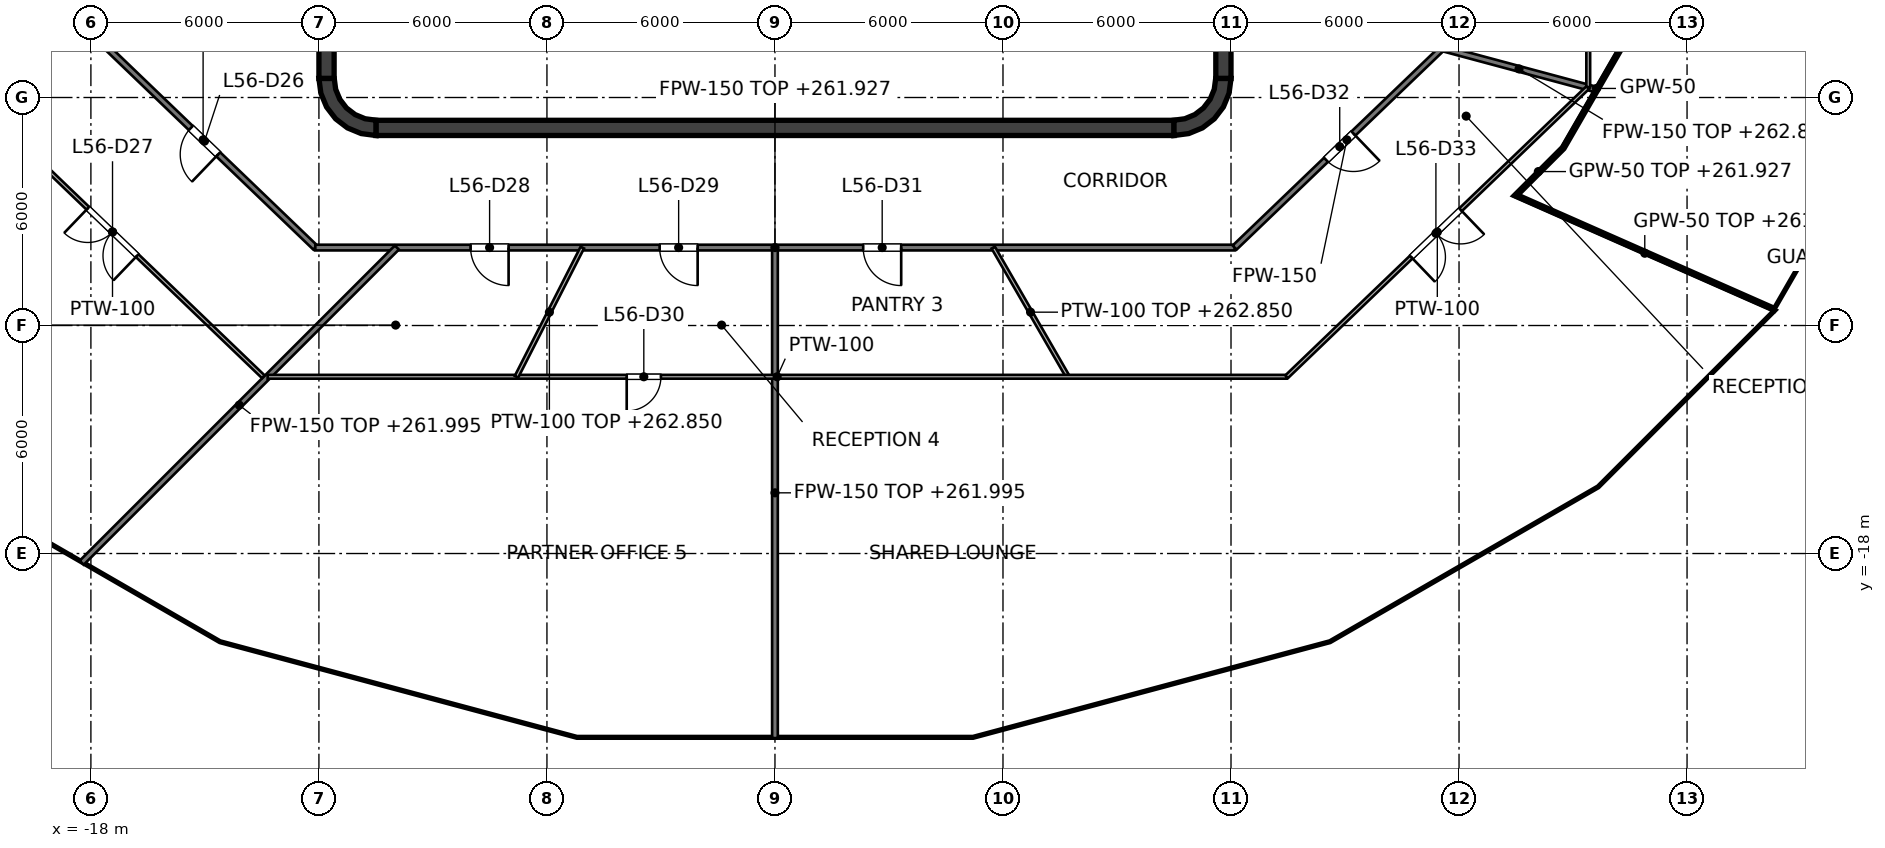
"""IFC4 building model, lengths in metres.
Left out: names, types, materials, properties, quantities, classifications, styles, units other than length and angle.
Written with IfcOpenShell. Run it as: python <this file> out.ifc"""

import sys

from ifc_helpers import new_model, si_unit, direction, frame, frame_2d, origin, place, context, subcontext, project, spatial, polyline, rectangle, outline, extrude, element, fill, save


model = new_model("IFC4")
c1 = context("Model", 3, precision=1e-05, world=origin(), true_north=direction((0.0, 1.0)))
c2 = subcontext(c1, "Body", "Model", "MODEL_VIEW")
j1 = project(units=[si_unit("LENGTHUNIT", "METRE"), si_unit("PLANEANGLEUNIT", "RADIAN")], contexts=[c1])
p1 = place(None, origin())
s1 = spatial("IfcSite", under=j1, at=p1, CompositionType="ELEMENT")
p2 = place(p1, origin())
s2 = spatial("IfcBuilding", under=s1, at=p2, CompositionType="ELEMENT")
p3 = place(p2, frame((0.0, 0.0, 259.0)))
s3 = spatial("IfcBuildingStorey", under=s2, at=p3, CompositionType="ELEMENT", Elevation=259.0)
p4 = place(p3, frame((-10.5, -6.8, 0.0), z_axis=(0.0, 0.0, 1.0), x_axis=(1.0, 0.0, 0.0)))
e1 = element("IfcWall", 1, at=p4, inside=s3, PredefinedType="SHEAR", context=c2, shape_type="SweptSolid", body=[
    extrude(rectangle(XDim=21.0, YDim=0.4, at=frame_2d((10.5, 0.0))), origin(), (0.0, 0.0, 1.0), 4.0),
])
p5 = place(p3, frame((11.8, -5.5, 0.0), z_axis=(0.0, 0.0, 1.0), x_axis=(0.0, 1.0, 0.0)))
e2 = element("IfcWall", 2, at=p5, inside=s3, PredefinedType="SHEAR", context=c2, shape_type="SweptSolid", body=[
    extrude(rectangle(XDim=11.0, YDim=0.4, at=frame_2d((5.5, 0.0))), origin(), (0.0, 0.0, 1.0), 4.0),
])
p6 = place(p5, frame((3.2, 0.0, 0.0)))
e3 = element("IfcOpeningElement", 3, at=p6, cuts=e2, PredefinedType="OPENING", context=c2, shape_type="SweptSolid", body=[
    extrude(rectangle(XDim=1.0, YDim=2.1, at=frame_2d((0.5, 1.05))), frame((0.0, 0.2, 0.0), z_axis=(0.0, -1.0, 0.0), x_axis=(1.0, 0.0, 0.0)), (0.0, 0.0, 1.0), 0.4),
])
p7 = place(p5, frame((6.1, 0.0, 0.0)))
e4 = element("IfcOpeningElement", 4, at=p7, cuts=e2, PredefinedType="OPENING", context=c2, shape_type="SweptSolid", body=[
    extrude(rectangle(XDim=1.0, YDim=2.1, at=frame_2d((0.5, 1.05))), frame((0.0, 0.2, 0.0), z_axis=(0.0, -1.0, 0.0), x_axis=(1.0, 0.0, 0.0)), (0.0, 0.0, 1.0), 0.4),
])
p8 = place(p5, frame((0.9, 0.0, 0.0)))
e5 = element("IfcOpeningElement", 5, at=p8, cuts=e2, PredefinedType="OPENING", context=c2, shape_type="SweptSolid", body=[
    extrude(rectangle(XDim=1.2, YDim=2.1, at=frame_2d((0.6, 1.05))), frame((0.0, 0.2, 0.0), z_axis=(0.0, -1.0, 0.0), x_axis=(1.0, 0.0, 0.0)), (0.0, 0.0, 1.0), 0.4),
])
p9 = place(p5, frame((8.9, 0.0, 0.0)))
e6 = element("IfcOpeningElement", 6, at=p9, cuts=e2, PredefinedType="OPENING", context=c2, shape_type="SweptSolid", body=[
    extrude(rectangle(XDim=1.2, YDim=2.1, at=frame_2d((0.6, 1.05))), frame((0.0, 0.2, 0.0), z_axis=(0.0, -1.0, 0.0), x_axis=(1.0, 0.0, 0.0)), (0.0, 0.0, 1.0), 0.4),
])
p10 = place(p3, frame((-11.8, -5.5, 0.0), z_axis=(0.0, 0.0, 1.0), x_axis=(0.0, 1.0, 0.0)))
e7 = element("IfcWall", 7, at=p10, inside=s3, PredefinedType="SHEAR", context=c2, shape_type="SweptSolid", body=[
    extrude(rectangle(XDim=11.0, YDim=0.4, at=frame_2d((5.5, 0.0))), origin(), (0.0, 0.0, 1.0), 4.0),
])
p11 = place(p10, frame((3.8, 0.0, 0.0)))
e8 = element("IfcOpeningElement", 8, at=p11, cuts=e7, PredefinedType="OPENING", context=c2, shape_type="SweptSolid", body=[
    extrude(rectangle(XDim=1.0, YDim=2.1, at=frame_2d((0.5, 1.05))), frame((0.0, 0.2, 0.0), z_axis=(0.0, -1.0, 0.0), x_axis=(1.0, 0.0, 0.0)), (0.0, 0.0, 1.0), 0.4),
])
p12 = place(p10, frame((6.7, 0.0, 0.0)))
e9 = element("IfcOpeningElement", 9, at=p12, cuts=e7, PredefinedType="OPENING", context=c2, shape_type="SweptSolid", body=[
    extrude(rectangle(XDim=1.0, YDim=2.1, at=frame_2d((0.5, 1.05))), frame((0.0, 0.2, 0.0), z_axis=(0.0, -1.0, 0.0), x_axis=(1.0, 0.0, 0.0)), (0.0, 0.0, 1.0), 0.4),
])
p13 = place(p10, frame((0.9, 0.0, 0.0)))
e10 = element("IfcOpeningElement", 10, at=p13, cuts=e7, PredefinedType="OPENING", context=c2, shape_type="SweptSolid", body=[
    extrude(rectangle(XDim=1.2, YDim=2.1, at=frame_2d((0.6, 1.05))), frame((0.0, 0.2, 0.0), z_axis=(0.0, -1.0, 0.0), x_axis=(1.0, 0.0, 0.0)), (0.0, 0.0, 1.0), 0.4),
])
p14 = place(p10, frame((8.9, 0.0, 0.0)))
e11 = element("IfcOpeningElement", 11, at=p14, cuts=e7, PredefinedType="OPENING", context=c2, shape_type="SweptSolid", body=[
    extrude(rectangle(XDim=1.2, YDim=2.1, at=frame_2d((0.6, 1.05))), frame((0.0, 0.2, 0.0), z_axis=(0.0, -1.0, 0.0), x_axis=(1.0, 0.0, 0.0)), (0.0, 0.0, 1.0), 0.4),
])
p15 = place(p3, origin())
e12 = element("IfcWall", 12, at=p15, inside=s3, PredefinedType="SHEAR", context=c2, shape_type="SweptSolid", body=[
    extrude(outline(polyline([(-10.5, -7.0), (-10.5, -6.596), (-10.784, -6.559), (-11.048, -6.45), (-11.275, -6.275), (-11.45, -6.048), (-11.559, -5.784), (-11.596, -5.5), (-12.0, -5.5), (-11.949, -5.888), (-11.799, -6.25), (-11.561, -6.561), (-11.25, -6.799), (-10.888, -6.949), (-10.5, -7.0)])), origin(), (0.0, 0.0, 1.0), 4.0),
])
e13 = element("IfcWall", 13, at=p15, inside=s3, PredefinedType="SHEAR", context=c2, shape_type="SweptSolid", body=[
    extrude(outline(polyline([(12.0, -5.5), (11.596, -5.5), (11.559, -5.784), (11.45, -6.048), (11.275, -6.275), (11.048, -6.45), (10.784, -6.559), (10.5, -6.596), (10.5, -7.0), (10.888, -6.949), (11.25, -6.799), (11.561, -6.561), (11.799, -6.25), (11.949, -5.888), (12.0, -5.5)])), origin(), (0.0, 0.0, 1.0), 4.0),
])
p16 = place(p3, frame((-1.2, -6.6, 0.0), z_axis=(0.0, 0.0, 1.0), x_axis=(0.0, 1.0, 0.0)))
e14 = element("IfcWall", 14, at=p16, inside=s3, PredefinedType="PARTITIONING", context=c2, shape_type="SweptSolid", body=[
    extrude(rectangle(XDim=2.5, YDim=0.15, at=frame_2d((1.25, 0.0))), origin(), (0.0, 0.0, 1.0), 3.85),
])
p17 = place(p16, frame((0.8, 0.0, 0.0)))
e15 = element("IfcOpeningElement", 15, at=p17, cuts=e14, PredefinedType="OPENING", context=c2, shape_type="SweptSolid", body=[
    extrude(rectangle(XDim=0.9, YDim=2.1, at=frame_2d((0.45, 1.05))), frame((0.0, 0.075, 0.0), z_axis=(0.0, -1.0, 0.0), x_axis=(1.0, 0.0, 0.0)), (0.0, 0.0, 1.0), 0.15),
])
p18 = place(p3, frame((9.0, -6.6, 0.0), z_axis=(0.0, 0.0, 1.0), x_axis=(0.0, 1.0, 0.0)))
e16 = element("IfcWall", 16, at=p18, inside=s3, PredefinedType="SOLIDWALL", context=c2, shape_type="SweptSolid", body=[
    extrude(rectangle(XDim=2.5, YDim=0.25, at=frame_2d((1.25, 0.0))), origin(), (0.0, 0.0, 1.0), 3.85),
])
p19 = place(p18, frame((0.65, 0.0, 0.0)))
e17 = element("IfcOpeningElement", 17, at=p19, cuts=e16, PredefinedType="OPENING", context=c2, shape_type="SweptSolid", body=[
    extrude(rectangle(XDim=1.2, YDim=2.1, at=frame_2d((0.6, 1.05))), frame((0.0, 0.125, 0.0), z_axis=(0.0, -1.0, 0.0), x_axis=(1.0, 0.0, 0.0)), (0.0, 0.0, 1.0), 0.25),
])
p20 = place(p3, frame((-9.0, -6.6, 0.0), z_axis=(0.0, 0.0, 1.0), x_axis=(0.0, 1.0, 0.0)))
e18 = element("IfcWall", 18, at=p20, inside=s3, PredefinedType="PARTITIONING", context=c2, shape_type="SweptSolid", body=[
    extrude(rectangle(XDim=2.5, YDim=0.25, at=frame_2d((1.25, 0.0))), origin(), (0.0, 0.0, 1.0), 3.85),
])
p21 = place(p20, frame((0.75, 0.0, 0.0)))
e19 = element("IfcOpeningElement", 19, at=p21, cuts=e18, PredefinedType="OPENING", context=c2, shape_type="SweptSolid", body=[
    extrude(rectangle(XDim=1.0, YDim=2.1, at=frame_2d((0.5, 1.05))), frame((0.0, 0.125, 0.0), z_axis=(0.0, -1.0, 0.0), x_axis=(1.0, 0.0, 0.0)), (0.0, 0.0, 1.0), 0.25),
])
p22 = place(p3, frame((3.15, -6.6, 0.0), z_axis=(0.0, 0.0, 1.0), x_axis=(0.0, 1.0, 0.0)))
e20 = element("IfcWall", 20, at=p22, inside=s3, PredefinedType="SOLIDWALL", context=c2, shape_type="SweptSolid", body=[
    extrude(rectangle(XDim=2.5, YDim=0.25, at=frame_2d((1.25, 0.0))), origin(), (0.0, 0.0, 1.0), 3.85),
])
p23 = place(p3, frame((-2.9, -6.6, 0.0), z_axis=(0.0, 0.0, 1.0), x_axis=(0.0, 1.0, 0.0)))
e21 = element("IfcWall", 21, at=p23, inside=s3, PredefinedType="PARTITIONING", context=c2, shape_type="SweptSolid", body=[
    extrude(rectangle(XDim=2.5, YDim=0.25, at=frame_2d((1.25, 0.0))), origin(), (0.0, 0.0, 1.0), 3.85),
])
p24 = place(p23, frame((0.8, 0.0, 0.0)))
e22 = element("IfcOpeningElement", 22, at=p24, cuts=e21, PredefinedType="OPENING", context=c2, shape_type="SweptSolid", body=[
    extrude(rectangle(XDim=0.9, YDim=2.1, at=frame_2d((0.45, 1.05))), frame((0.0, 0.125, 0.0), z_axis=(0.0, -1.0, 0.0), x_axis=(1.0, 0.0, 0.0)), (0.0, 0.0, 1.0), 0.25),
])
p25 = place(p3, frame((-18.0, -4.278, 0.0), z_axis=(0.0, 0.0, 1.0), x_axis=(0.721290181137, -0.692633001376, 0.0)))
e23 = element("IfcWall", 23, at=p25, inside=s3, PredefinedType="PARTITIONING", context=c2, shape_type="SweptSolid", body=[
    extrude(rectangle(XDim=8.187, YDim=0.15, at=frame_2d((4.094, 0.0))), origin(), (0.0, 0.0, 1.0), 2.918),
])
p26 = place(p25, frame((3.645, 0.0, 0.0)))
e24 = element("IfcOpeningElement", 24, at=p26, cuts=e23, PredefinedType="OPENING", context=c2, shape_type="SweptSolid", body=[
    extrude(rectangle(XDim=1.0, YDim=2.1, at=frame_2d((0.5, 1.05))), frame((0.0, 0.075, 0.0), z_axis=(0.0, -1.0, 0.0), x_axis=(1.0, 0.0, 0.0)), (0.0, 0.0, 1.0), 0.15),
])
p27 = place(p3, frame((17.556, -4.704, 0.0), z_axis=(0.0, 0.0, 1.0), x_axis=(0.965793364166, -0.259312895424, 0.0)))
e25 = element("IfcWall", 25, at=p27, inside=s3, PredefinedType="PARTITIONING", context=c2, shape_type="SweptSolid", body=[
    extrude(rectangle(XDim=4.189, YDim=0.15, at=frame_2d((2.094, 0.0))), origin(), (0.0, 0.0, 1.0), 3.85),
])
p28 = place(p3, frame((-12.095, -9.949, 0.0), z_axis=(0.0, 0.0, 1.0), x_axis=(1.0, 0.0, 0.0)))
e26 = element("IfcWall", 26, at=p28, inside=s3, PredefinedType="PARTITIONING", context=c2, shape_type="SweptSolid", body=[
    extrude(rectangle(XDim=24.19, YDim=0.15, at=frame_2d((12.095, 0.0))), origin(), (0.0, 0.0, 1.0), 2.927),
])
p29 = place(p28, frame((4.086, 0.0, 0.0)))
e27 = element("IfcOpeningElement", 27, at=p29, cuts=e26, PredefinedType="OPENING", context=c2, shape_type="SweptSolid", body=[
    extrude(rectangle(XDim=1.0, YDim=2.1, at=frame_2d((0.5, 1.05))), frame((0.0, 0.075, 0.0), z_axis=(0.0, -1.0, 0.0), x_axis=(1.0, 0.0, 0.0)), (0.0, 0.0, 1.0), 0.15),
])
p30 = place(p28, frame((9.061, 0.0, 0.0)))
e28 = element("IfcOpeningElement", 28, at=p30, cuts=e26, PredefinedType="OPENING", context=c2, shape_type="SweptSolid", body=[
    extrude(rectangle(XDim=1.0, YDim=2.1, at=frame_2d((0.5, 1.05))), frame((0.0, 0.075, 0.0), z_axis=(0.0, -1.0, 0.0), x_axis=(1.0, 0.0, 0.0)), (0.0, 0.0, 1.0), 0.15),
])
p31 = place(p28, frame((14.417, 0.0, 0.0)))
e29 = element("IfcOpeningElement", 29, at=p31, cuts=e26, PredefinedType="OPENING", context=c2, shape_type="SweptSolid", body=[
    extrude(rectangle(XDim=1.0, YDim=2.1, at=frame_2d((0.5, 1.05))), frame((0.0, 0.075, 0.0), z_axis=(0.0, -1.0, 0.0), x_axis=(1.0, 0.0, 0.0)), (0.0, 0.0, 1.0), 0.15),
])
p32 = place(p3, frame((12.095, -9.949, 0.0), z_axis=(0.0, 0.0, 1.0), x_axis=(0.721348586031, 0.692572174889, 0.0)))
e30 = element("IfcWall", 30, at=p32, inside=s3, PredefinedType="PARTITIONING", context=c2, shape_type="SweptSolid", body=[
    extrude(rectangle(XDim=8.187, YDim=0.15, at=frame_2d((4.094, 0.0))), origin(), (0.0, 0.0, 1.0), 2.918),
])
p33 = place(p32, frame((3.334, 0.0, 0.0)))
e31 = element("IfcOpeningElement", 31, at=p33, cuts=e30, PredefinedType="OPENING", context=c2, shape_type="SweptSolid", body=[
    extrude(rectangle(XDim=1.0, YDim=2.1, at=frame_2d((0.5, 1.05))), frame((0.0, 0.075, 0.0), z_axis=(0.0, -1.0, 0.0), x_axis=(1.0, 0.0, 0.0)), (0.0, 0.0, 1.0), 0.15),
])
p34 = place(p3, frame((-18.242, -18.242, 0.0), z_axis=(0.0, 0.0, 1.0), x_axis=(0.707106781187, 0.707106781187, 0.0)))
e32 = element("IfcWall", 32, at=p34, inside=s3, PredefinedType="PARTITIONING", context=c2, shape_type="SweptSolid", body=[
    extrude(rectangle(XDim=11.728, YDim=0.15, at=frame_2d((5.864, 0.0))), origin(), (0.0, 0.0, 1.0), 2.995),
])
p35 = place(p3, frame((0.0, -22.857, 0.0), z_axis=(0.0, 0.0, 1.0), x_axis=(0.0, 1.0, 0.0)))
e33 = element("IfcWall", 33, at=p35, inside=s3, PredefinedType="PARTITIONING", context=c2, shape_type="SweptSolid", body=[
    extrude(rectangle(XDim=12.908, YDim=0.15, at=frame_2d((6.454, 0.0))), origin(), (0.0, 0.0, 1.0), 2.995),
])
p36 = place(p3, frame((19.453, -8.583, 0.0), z_axis=(0.0, 0.0, 1.0), x_axis=(0.914941111659, -0.40358736625, 0.0)))
e34 = element("IfcWall", 34, at=p36, inside=s3, PredefinedType="PARTITIONING", context=c2, shape_type="SweptSolid", body=[
    extrude(rectangle(XDim=7.508, YDim=0.05, at=frame_2d((3.754, 0.0))), origin(), (0.0, 0.0, 1.0), 2.927),
])
p37 = place(p3, frame((19.453, -8.583, 0.0), z_axis=(0.0, 0.0, 1.0), x_axis=(0.706834345547, 0.707379111902, 0.0)))
e35 = element("IfcWall", 35, at=p37, inside=s3, PredefinedType="PARTITIONING", context=c2, shape_type="SweptSolid", body=[
    extrude(rectangle(XDim=1.793, YDim=0.05, at=frame_2d((0.896, 0.0))), origin(), (0.0, 0.0, 1.0), 2.927),
])
p38 = place(p3, frame((20.72, -7.315, 0.0), z_axis=(0.0, 0.0, 1.0), x_axis=(0.500032687935, 0.866006530574, 0.0)))
e36 = element("IfcWall", 36, at=p38, inside=s3, PredefinedType="PARTITIONING", context=c2, shape_type="SweptSolid", body=[
    extrude(rectangle(XDim=3.588, YDim=0.05, at=frame_2d((1.794, 0.0))), origin(), (0.0, 0.0, 1.0), 2.918),
])
p39 = place(p3, frame((5.744, -9.949, 0.0), z_axis=(0.0, 0.0, 1.0), x_axis=(0.500011323479, -0.866018866072, 0.0)))
e37 = element("IfcWall", 37, at=p39, inside=s3, PredefinedType="PARTITIONING", context=c2, shape_type="SweptSolid", body=[
    extrude(rectangle(XDim=3.926, YDim=0.1, at=frame_2d((1.963, 0.0))), origin(), (0.0, 0.0, 1.0), 3.85),
])
p40 = place(p3, frame((-21.4, -5.727, 0.0), z_axis=(0.0, 0.0, 1.0), x_axis=(0.72128312314, -0.692640351317, 0.0)))
e38 = element("IfcWall", 38, at=p40, inside=s3, PredefinedType="PARTITIONING", context=c2, shape_type="SweptSolid", body=[
    extrude(rectangle(XDim=11.004, YDim=0.1, at=frame_2d((5.502, 0.0))), origin(), (0.0, 0.0, 1.0), 2.927),
])
p41 = place(p40, frame((4.603, 0.0, 0.0)))
e39 = element("IfcOpeningElement", 39, at=p41, cuts=e38, PredefinedType="OPENING", context=c2, shape_type="SweptSolid", body=[
    extrude(rectangle(XDim=1.8, YDim=2.1, at=frame_2d((0.9, 1.05))), frame((0.0, 0.05, 0.0), z_axis=(0.0, -1.0, 0.0), x_axis=(1.0, 0.0, 0.0)), (0.0, 0.0, 1.0), 0.1),
])
p42 = place(p3, frame((-13.349, -13.349, 0.0), z_axis=(0.0, 0.0, 1.0), x_axis=(1.0, 0.0, 0.0)))
e40 = element("IfcWall", 40, at=p42, inside=s3, PredefinedType="PARTITIONING", context=c2, shape_type="SweptSolid", body=[
    extrude(rectangle(XDim=26.812, YDim=0.1, at=frame_2d((13.406, 0.0))), origin(), (0.0, 0.0, 1.0), 2.927),
])
p43 = place(p42, frame((9.448, 0.0, 0.0)))
e41 = element("IfcOpeningElement", 41, at=p43, cuts=e40, PredefinedType="OPENING", context=c2, shape_type="SweptSolid", body=[
    extrude(rectangle(XDim=0.9, YDim=2.1, at=frame_2d((0.45, 1.05))), frame((0.0, 0.05, 0.0), z_axis=(0.0, -1.0, 0.0), x_axis=(1.0, 0.0, 0.0)), (0.0, 0.0, 1.0), 0.1),
])
p44 = place(p3, frame((13.463, -13.349, 0.0), z_axis=(0.0, 0.0, 1.0), x_axis=(0.721271070112, 0.692652902556, 0.0)))
e42 = element("IfcWall", 42, at=p44, inside=s3, PredefinedType="PARTITIONING", context=c2, shape_type="SweptSolid", body=[
    extrude(rectangle(XDim=10.996, YDim=0.1, at=frame_2d((5.498, 0.0))), origin(), (0.0, 0.0, 1.0), 2.927),
])
p45 = place(p44, frame((4.547, 0.0, 0.0)))
e43 = element("IfcOpeningElement", 43, at=p45, cuts=e42, PredefinedType="OPENING", context=c2, shape_type="SweptSolid", body=[
    extrude(rectangle(XDim=1.8, YDim=2.1, at=frame_2d((0.9, 1.05))), frame((0.0, 0.05, 0.0), z_axis=(0.0, -1.0, 0.0), x_axis=(1.0, 0.0, 0.0)), (0.0, 0.0, 1.0), 0.1),
])
p46 = place(p3, frame((-6.802, -13.349, 0.0), z_axis=(0.0, 0.0, 1.0), x_axis=(0.454083899838, 0.890958928295, 0.0)))
e44 = element("IfcWall", 44, at=p46, inside=s3, PredefinedType="PARTITIONING", context=c2, shape_type="SweptSolid", body=[
    extrude(rectangle(XDim=3.816, YDim=0.1, at=frame_2d((1.908, 0.0))), origin(), (0.0, 0.0, 1.0), 3.85),
])
p47 = place(p3, frame((21.4, -5.727, 0.0), z_axis=(0.0, 0.0, 1.0), x_axis=(0.0, 1.0, 0.0)))
e45 = element("IfcWall", 45, at=p47, inside=s3, PredefinedType="PARTITIONING", context=c2, shape_type="SweptSolid", body=[
    extrude(rectangle(XDim=11.454, YDim=0.1, at=frame_2d((5.727, 0.0))), origin(), (0.0, 0.0, 1.0), 2.918),
])
p48 = place(p19, origin())
e46 = element("IfcDoor", 46, at=p48, inside=s3, OperationType="SINGLE_SWING_LEFT", PredefinedType="DOOR", context=c2, shape_type="SweptSolid", body=[
    extrude(rectangle(XDim=1.2, YDim=2.1, at=frame_2d((0.6, 1.05))), frame((0.0, 0.025, 0.0), z_axis=(0.0, -1.0, 0.0), x_axis=(1.0, 0.0, 0.0)), (0.0, 0.0, 1.0), 0.05),
])
fill(e17, e46)
p49 = place(p21, origin())
e47 = element("IfcDoor", 47, at=p49, inside=s3, OperationType="SINGLE_SWING_LEFT", PredefinedType="DOOR", context=c2, shape_type="SweptSolid", body=[
    extrude(rectangle(XDim=1.0, YDim=2.1, at=frame_2d((0.5, 1.05))), frame((0.0, 0.025, 0.0), z_axis=(0.0, -1.0, 0.0), x_axis=(1.0, 0.0, 0.0)), (0.0, 0.0, 1.0), 0.05),
])
fill(e19, e47)
p50 = place(p24, origin())
e48 = element("IfcDoor", 48, at=p50, inside=s3, OperationType="SINGLE_SWING_RIGHT", PredefinedType="DOOR", context=c2, shape_type="SweptSolid", body=[
    extrude(rectangle(XDim=0.9, YDim=2.1, at=frame_2d((0.45, 1.05))), frame((0.0, 0.025, 0.0), z_axis=(0.0, -1.0, 0.0), x_axis=(1.0, 0.0, 0.0)), (0.0, 0.0, 1.0), 0.05),
])
fill(e22, e48)
p51 = place(p17, origin())
e49 = element("IfcDoor", 49, at=p51, inside=s3, OperationType="SINGLE_SWING_RIGHT", PredefinedType="DOOR", context=c2, shape_type="SweptSolid", body=[
    extrude(rectangle(XDim=0.9, YDim=2.1, at=frame_2d((0.45, 1.05))), frame((0.0, 0.025, 0.0), z_axis=(0.0, -1.0, 0.0), x_axis=(1.0, 0.0, 0.0)), (0.0, 0.0, 1.0), 0.05),
])
fill(e15, e49)
p52 = place(p26, origin())
e50 = element("IfcDoor", 50, at=p52, inside=s3, OperationType="SINGLE_SWING_RIGHT", PredefinedType="DOOR", context=c2, shape_type="SweptSolid", body=[
    extrude(rectangle(XDim=1.0, YDim=2.1, at=frame_2d((0.5, 1.05))), frame((0.0, 0.025, 0.0), z_axis=(0.0, -1.0, 0.0), x_axis=(1.0, 0.0, 0.0)), (0.0, 0.0, 1.0), 0.05),
])
fill(e24, e50)
p53 = place(p41, origin())
e51 = element("IfcDoor", 51, at=p53, inside=s3, OperationType="DOUBLE_DOOR_SINGLE_SWING", PredefinedType="DOOR", context=c2, shape_type="SweptSolid", body=[
    extrude(rectangle(XDim=1.8, YDim=2.1, at=frame_2d((0.9, 1.05))), frame((0.0, 0.025, 0.0), z_axis=(0.0, -1.0, 0.0), x_axis=(1.0, 0.0, 0.0)), (0.0, 0.0, 1.0), 0.05),
])
fill(e39, e51)
p54 = place(p29, origin())
e52 = element("IfcDoor", 52, at=p54, inside=s3, OperationType="SINGLE_SWING_RIGHT", PredefinedType="DOOR", context=c2, shape_type="SweptSolid", body=[
    extrude(rectangle(XDim=1.0, YDim=2.1, at=frame_2d((0.5, 1.05))), frame((0.0, 0.025, 0.0), z_axis=(0.0, -1.0, 0.0), x_axis=(1.0, 0.0, 0.0)), (0.0, 0.0, 1.0), 0.05),
])
fill(e27, e52)
p55 = place(p30, origin())
e53 = element("IfcDoor", 53, at=p55, inside=s3, OperationType="SINGLE_SWING_RIGHT", PredefinedType="DOOR", context=c2, shape_type="SweptSolid", body=[
    extrude(rectangle(XDim=1.0, YDim=2.1, at=frame_2d((0.5, 1.05))), frame((0.0, 0.025, 0.0), z_axis=(0.0, -1.0, 0.0), x_axis=(1.0, 0.0, 0.0)), (0.0, 0.0, 1.0), 0.05),
])
fill(e28, e53)
p56 = place(p43, origin())
e54 = element("IfcDoor", 54, at=p56, inside=s3, OperationType="SINGLE_SWING_LEFT", PredefinedType="DOOR", context=c2, shape_type="SweptSolid", body=[
    extrude(rectangle(XDim=0.9, YDim=2.1, at=frame_2d((0.45, 1.05))), frame((0.0, 0.025, 0.0), z_axis=(0.0, -1.0, 0.0), x_axis=(1.0, 0.0, 0.0)), (0.0, 0.0, 1.0), 0.05),
])
fill(e41, e54)
p57 = place(p31, origin())
e55 = element("IfcDoor", 55, at=p57, inside=s3, OperationType="SINGLE_SWING_RIGHT", PredefinedType="DOOR", context=c2, shape_type="SweptSolid", body=[
    extrude(rectangle(XDim=1.0, YDim=2.1, at=frame_2d((0.5, 1.05))), frame((0.0, 0.025, 0.0), z_axis=(0.0, -1.0, 0.0), x_axis=(1.0, 0.0, 0.0)), (0.0, 0.0, 1.0), 0.05),
])
fill(e29, e55)
p58 = place(p33, origin())
e56 = element("IfcDoor", 56, at=p58, inside=s3, OperationType="SINGLE_SWING_RIGHT", PredefinedType="DOOR", context=c2, shape_type="SweptSolid", body=[
    extrude(rectangle(XDim=1.0, YDim=2.1, at=frame_2d((0.5, 1.05))), frame((0.0, 0.025, 0.0), z_axis=(0.0, -1.0, 0.0), x_axis=(1.0, 0.0, 0.0)), (0.0, 0.0, 1.0), 0.05),
])
fill(e31, e56)
p59 = place(p45, origin())
e57 = element("IfcDoor", 57, at=p59, inside=s3, OperationType="DOUBLE_DOOR_SINGLE_SWING", PredefinedType="DOOR", context=c2, shape_type="SweptSolid", body=[
    extrude(rectangle(XDim=1.8, YDim=2.1, at=frame_2d((0.9, 1.05))), frame((0.0, 0.025, 0.0), z_axis=(0.0, -1.0, 0.0), x_axis=(1.0, 0.0, 0.0)), (0.0, 0.0, 1.0), 0.05),
])
fill(e43, e57)
save(model, sys.argv[1])
